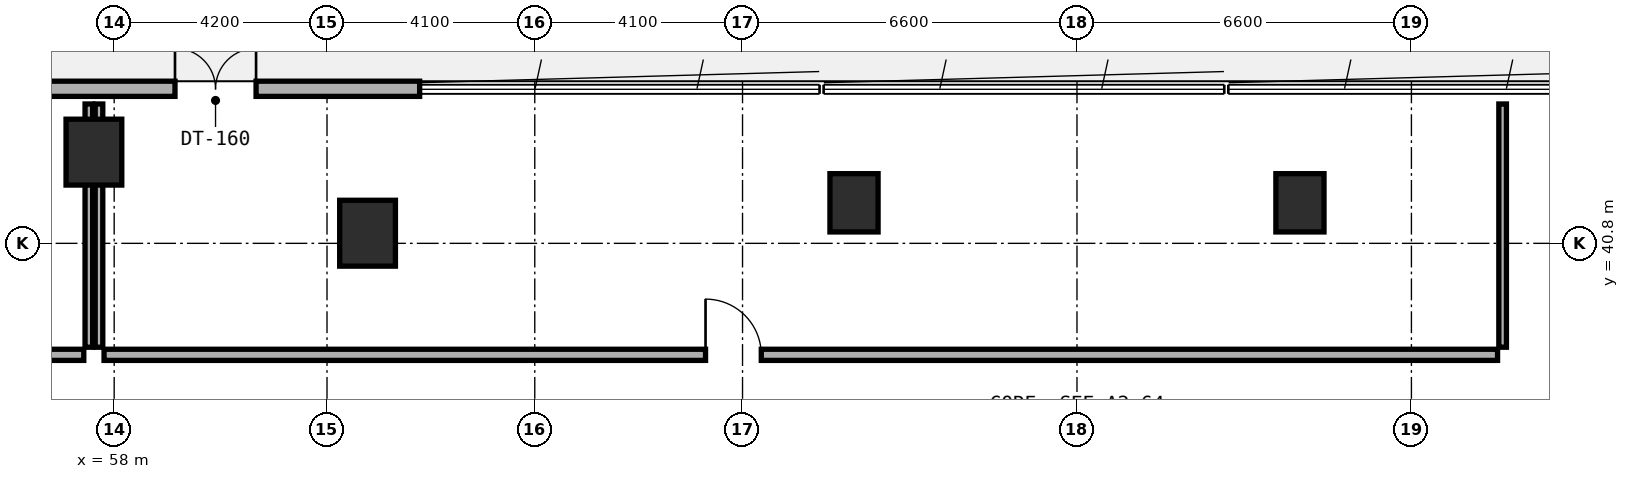
"""IFC4 building model, lengths in metres.
Left out: names, types, materials, properties, quantities, classifications, styles, units other than length and angle.
Written with IfcOpenShell. Run it as: python <this file> out.ifc"""

import sys

from ifc_helpers import new_model, si_unit, direction, frame, frame_2d, origin, origin_2d, place, context, subcontext, project, spatial, rectangle, extrude, element, fill, save


model = new_model("IFC4")
c1 = context("Model", 3, precision=1e-05, world=origin(), true_north=direction((0.0, 1.0)))
c2 = subcontext(c1, "Body", "Model", "MODEL_VIEW")
j1 = project(units=[si_unit("LENGTHUNIT", "METRE"), si_unit("PLANEANGLEUNIT", "RADIAN")], contexts=[c1])
p1 = place(None, origin())
s1 = spatial("IfcSite", under=j1, at=p1, CompositionType="ELEMENT")
p2 = place(p1, origin())
s2 = spatial("IfcBuilding", under=s1, at=p2, CompositionType="ELEMENT")
p3 = place(p2, frame((0.0, 0.0, 15.0)))
s3 = spatial("IfcBuildingStorey", under=s2, at=p3, CompositionType="ELEMENT", Elevation=15.0)
for number, where, z_axis, x_axis in (
    (1, (72.6, 41.6, 0.0), (0.0, 0.0, 1.0), (1.0, 0.0, 0.0)),
    (2, (81.4, 41.6, 0.0), (0.0, 0.0, 1.0), (1.0, 0.0, 0.0)),
):
    element("IfcColumn", number, at=place(p3, frame(where, z_axis=z_axis, x_axis=x_axis)), inside=s3, PredefinedType="COLUMN", context=c2, shape_type="SweptSolid", body=[
        extrude(rectangle(XDim=0.95, YDim=1.15, at=origin_2d()), origin(), (0.0, 0.0, 1.0), 4.5),
    ])
for number, where, z_axis, x_axis in (
    (3, (63.0, 41.0, 0.0), (0.0, 0.0, 1.0), (1.0, 0.0, 0.0)),
    (4, (57.6, 42.6, 0.0), (0.0, 0.0, 1.0), (1.0, 0.0, 0.0)),
):
    element("IfcColumn", number, at=place(p3, frame(where, z_axis=z_axis, x_axis=x_axis)), inside=s3, PredefinedType="COLUMN", context=c2, shape_type="SweptSolid", body=[
        extrude(rectangle(XDim=1.1, YDim=1.3, at=origin_2d()), origin(), (0.0, 0.0, 1.0), 4.5),
    ])
p4 = place(p3, frame((64.028, 43.85, 0.0), z_axis=(0.0, 0.0, 1.0), x_axis=(-1.0, 0.0, 0.0)))
e5 = element("IfcWall", 5, at=p4, inside=s3, PredefinedType="STANDARD", context=c2, shape_type="SweptSolid", body=[
    extrude(rectangle(XDim=8.049, YDim=0.3, at=frame_2d((4.024, 0.0))), origin(), (0.0, 0.0, 1.0), 4.1),
])
p5 = place(p4, frame((3.228, 0.0, 0.0)))
e6 = element("IfcOpeningElement", 6, at=p5, cuts=e5, PredefinedType="OPENING", context=c2, shape_type="SweptSolid", body=[
    extrude(rectangle(XDim=1.6, YDim=2.2, at=frame_2d((0.8, 1.1))), frame((0.0, 0.16, 0.0), z_axis=(0.0, -1.0, 0.0), x_axis=(1.0, 0.0, 0.0)), (0.0, 0.0, 1.0), 0.32),
])
p6 = place(p3, frame((57.5, 38.75, 0.0), z_axis=(0.0, 0.0, 1.0), x_axis=(0.0, 1.0, 0.0)))
e7 = element("IfcWall", 7, at=p6, inside=s3, PredefinedType="PARTITIONING", context=c2, shape_type="SweptSolid", body=[
    extrude(rectangle(XDim=4.8, YDim=0.15, at=frame_2d((2.4, 0.0))), origin(), (0.0, 0.0, 1.0), 3.275),
])
p7 = place(p3, frame((38.3, 38.6, 0.0), z_axis=(0.0, 0.0, 1.0), x_axis=(1.0, 0.0, 0.0)))
e8 = element("IfcWall", 8, at=p7, inside=s3, PredefinedType="SOLIDWALL", context=c2, shape_type="SweptSolid", body=[
    extrude(rectangle(XDim=19.1, YDim=0.22, at=frame_2d((9.55, 0.0))), origin(), (0.0, 0.0, 1.0), 3.375),
])
p8 = place(p7, frame((8.09, 0.0, 0.0)))
e9 = element("IfcOpeningElement", 9, at=p8, cuts=e8, PredefinedType="OPENING", context=c2, shape_type="SweptSolid", body=[
    extrude(rectangle(XDim=1.1, YDim=2.1, at=frame_2d((0.55, 1.05))), frame((0.0, 0.12, 0.0), z_axis=(0.0, -1.0, 0.0), x_axis=(1.0, 0.0, 0.0)), (0.0, 0.0, 1.0), 0.24),
])
p9 = place(p3, frame((57.7, 38.75, 0.0), z_axis=(0.0, 0.0, 1.0), x_axis=(0.0, 1.0, 0.0)))
e10 = element("IfcWall", 10, at=p9, inside=s3, PredefinedType="PARTITIONING", context=c2, shape_type="SweptSolid", body=[
    extrude(rectangle(XDim=4.8, YDim=0.15, at=frame_2d((2.4, 0.0))), origin(), (0.0, 0.0, 1.0), 3.375),
])
p10 = place(p3, frame((85.4, 38.75, 0.0), z_axis=(0.0, 0.0, 1.0), x_axis=(0.0, 1.0, 0.0)))
e11 = element("IfcWall", 11, at=p10, inside=s3, PredefinedType="PARTITIONING", context=c2, shape_type="SweptSolid", body=[
    extrude(rectangle(XDim=4.8, YDim=0.15, at=frame_2d((2.4, 0.0))), origin(), (0.0, 0.0, 1.0), 3.715),
])
p11 = place(p3, frame((57.8, 38.6, 0.0), z_axis=(0.0, 0.0, 1.0), x_axis=(1.0, 0.0, 0.0)))
e12 = element("IfcWall", 12, at=p11, inside=s3, PredefinedType="SOLIDWALL", context=c2, shape_type="SweptSolid", body=[
    extrude(rectangle(XDim=27.5, YDim=0.22, at=frame_2d((13.75, 0.0))), origin(), (0.0, 0.0, 1.0), 3.575),
])
p12 = place(p11, frame((11.87, 0.0, 0.0)))
e13 = element("IfcOpeningElement", 13, at=p12, cuts=e12, PredefinedType="OPENING", context=c2, shape_type="SweptSolid", body=[
    extrude(rectangle(XDim=1.1, YDim=2.1, at=frame_2d((0.55, 1.05))), frame((0.0, 0.12, 0.0), z_axis=(0.0, -1.0, 0.0), x_axis=(1.0, 0.0, 0.0)), (0.0, 0.0, 1.0), 0.24),
])
p13 = place(p5, frame((1.6, 0.0, 0.0), z_axis=(0.0, 0.0, 1.0), x_axis=(-1.0, 0.0, 0.0)))
e14 = element("IfcDoor", 14, at=p13, inside=s3, OperationType="DOUBLE_DOOR_SINGLE_SWING", PredefinedType="DOOR", context=c2, shape_type="SweptSolid", body=[
    extrude(rectangle(XDim=1.6, YDim=2.2, at=frame_2d((0.8, 1.1))), frame((0.0, 0.025, 0.0), z_axis=(0.0, -1.0, 0.0), x_axis=(1.0, 0.0, 0.0)), (0.0, 0.0, 1.0), 0.05),
])
fill(e6, e14)
p14 = place(p12, origin())
e15 = element("IfcDoor", 15, at=p14, inside=s3, OperationType="SINGLE_SWING_LEFT", PredefinedType="DOOR", context=c2, shape_type="SweptSolid", body=[
    extrude(rectangle(XDim=1.1, YDim=2.1, at=frame_2d((0.55, 1.05))), frame((0.0, 0.025, 0.0), z_axis=(0.0, -1.0, 0.0), x_axis=(1.0, 0.0, 0.0)), (0.0, 0.0, 1.0), 0.05),
])
fill(e13, e15)
save(model, sys.argv[1])
